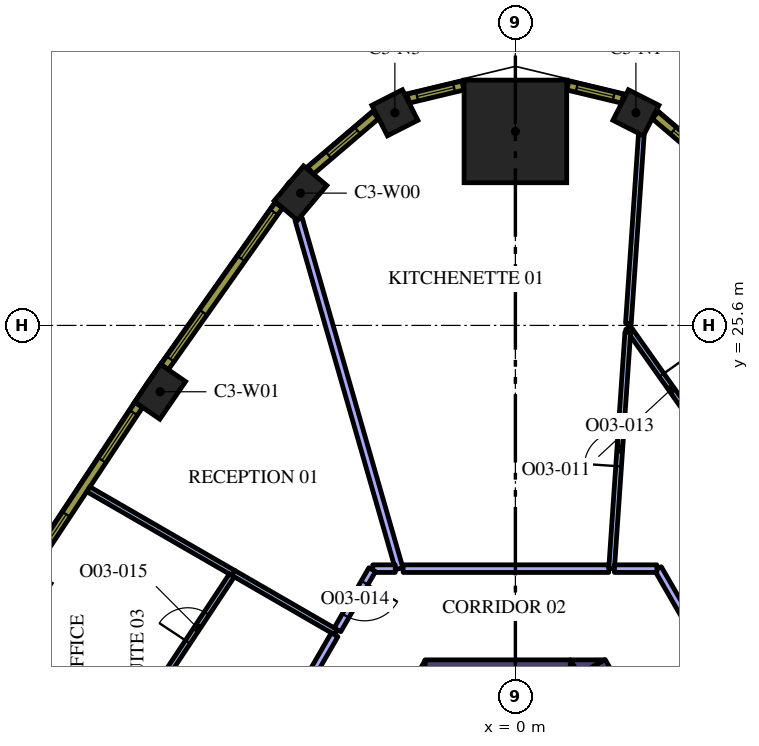
"""IFC4 building model, lengths in metres.
Left out: names, types, materials, properties, quantities, classifications, styles, units other than length and angle.
Written with IfcOpenShell. Run it as: python <this file> out.ifc"""

import sys

from ifc_helpers import new_model, si_unit, direction, frame, frame_2d, origin, origin_2d, place, context, subcontext, project, spatial, polyline, rectangle, outline, extrude, element, fill, save


model = new_model("IFC4")
c1 = context("Model", 3, precision=1e-05, world=origin(), true_north=direction((0.0, 1.0)))
c2 = subcontext(c1, "Body", "Model", "MODEL_VIEW")
j1 = project(units=[si_unit("LENGTHUNIT", "METRE"), si_unit("PLANEANGLEUNIT", "RADIAN")], contexts=[c1])
p1 = place(None, origin())
s1 = spatial("IfcSite", under=j1, at=p1, CompositionType="ELEMENT")
p2 = place(p1, origin())
s2 = spatial("IfcBuilding", under=s1, at=p2, CompositionType="ELEMENT")
p3 = place(p2, frame((0.0, 0.0, 166.8)))
s3 = spatial("IfcBuildingStorey", under=s2, at=p3, CompositionType="ELEMENT", Elevation=166.8)
p4 = place(p3, frame((0.0, 30.704, 0.0), z_axis=(0.0, 0.0, 1.0), x_axis=(0.0, 1.0, 0.0)))
e1 = element("IfcColumn", 1, at=p4, inside=s3, PredefinedType="COLUMN", context=c2, shape_type="SweptSolid", body=[
    extrude(rectangle(XDim=2.7, YDim=2.7, at=origin_2d()), origin(), (0.0, 0.0, 1.0), 4.2),
])
for number, where, z_axis, x_axis in (
    (2, (3.171, 31.195, 0.0), (0.0, 0.0, 1.0), (-0.891, 0.453, 0.0)),
    (3, (-3.171, 31.195, 0.0), (0.0, 0.0, 1.0), (-0.891, -0.453, 0.0)),
):
    element("IfcColumn", number, at=place(p3, frame(where, z_axis=z_axis, x_axis=x_axis)), inside=s3, PredefinedType="COLUMN", context=c2, shape_type="SweptSolid", body=[
        extrude(rectangle(XDim=0.9, YDim=0.9, at=origin_2d()), origin(), (0.0, 0.0, 1.0), 4.2),
    ])
for number, where, z_axis, x_axis in (
    (4, (-5.654, 29.081, 0.0), (0.0, 0.0, 1.0), (-0.644, -0.765, 0.0)),
    (5, (-9.348, 23.854, 0.0), (0.0, 0.0, 1.0), (-0.565, -0.825, 0.0)),
):
    element("IfcColumn", number, at=place(p3, frame(where, z_axis=z_axis, x_axis=x_axis)), inside=s3, PredefinedType="COLUMN", context=c2, shape_type="SweptSolid", body=[
        extrude(rectangle(XDim=1.2, YDim=0.8, at=origin_2d()), origin(), (0.0, 0.0, 1.0), 4.2),
    ])
p5 = place(p3, frame((8.279, 5.761, 0.0), z_axis=(0.0, 0.0, 1.0), x_axis=(-0.500010359015, 0.866019422922, 0.0)))
e6 = element("IfcWall", 6, at=p5, inside=s3, PredefinedType="SOLIDWALL", context=c2, shape_type="SweptSolid", body=[
    extrude(rectangle(XDim=12.528, YDim=0.8, at=frame_2d((6.264, 0.0))), origin(), (0.0, 0.0, 1.0), 4.2),
])
p6 = place(p3, origin())
e7 = element("IfcWall", 7, at=p6, inside=s3, PredefinedType="SOLIDWALL", context=c2, shape_type="SweptSolid", body=[
    extrude(outline(polyline([(1.443, 16.8), (2.339, 16.8), (1.667, 16.412), (1.443, 16.8)])), origin(), (0.0, 0.0, 1.0), 4.2),
])
p7 = place(p3, frame((-2.379, 16.4, 0.0), z_axis=(0.0, 0.0, 1.0), x_axis=(1.0, 0.0, 0.0)))
e8 = element("IfcWall", 8, at=p7, inside=s3, PredefinedType="SOLIDWALL", context=c2, shape_type="SweptSolid", body=[
    extrude(rectangle(XDim=3.824, YDim=0.8, at=frame_2d((1.912, 0.0))), origin(), (0.0, 0.0, 1.0), 4.2),
])
e9 = element("IfcWall", 9, at=p6, inside=s3, PredefinedType="SOLIDWALL", context=c2, shape_type="SweptSolid", body=[
    extrude(outline(polyline([(1.905, 16.0), (1.447, 16.0), (1.447, 16.793), (1.905, 16.0)])), origin(), (0.0, 0.0, 1.0), 4.2),
])
e10 = element("IfcWall", 10, at=p6, inside=s3, PredefinedType="SOLIDWALL", context=c2, shape_type="SweptSolid", body=[
    extrude(outline(polyline([(-2.829, 16.0), (-2.381, 16.776), (-2.381, 16.0), (-2.829, 16.0)])), origin(), (0.0, 0.0, 1.0), 4.2),
])
p8 = place(p3, frame((2.966, 25.539, 0.0), z_axis=(0.0, 0.0, 1.0), x_axis=(0.577099839594, -0.816673603798, 0.0)))
e11 = element("IfcWall", 11, at=p8, inside=s3, PredefinedType="PARTITIONING", context=c2, shape_type="SweptSolid", body=[
    extrude(rectangle(XDim=4.025, YDim=0.15, at=frame_2d((2.013, 0.0))), origin(), (0.0, 0.0, 1.0), 3.15),
])
p9 = place(p8, frame((1.525, 0.0, 0.0)))
e12 = element("IfcOpeningElement", 12, at=p9, cuts=e11, PredefinedType="OPENING", context=c2, shape_type="SweptSolid", body=[
    extrude(rectangle(XDim=0.9, YDim=2.1, at=frame_2d((0.45, 1.05))), frame((0.0, 0.085, 0.0), z_axis=(0.0, -1.0, 0.0), x_axis=(1.0, 0.0, 0.0)), (0.0, 0.0, 1.0), 0.17),
])
p10 = place(p3, frame((2.974, 25.657, 0.0), z_axis=(0.0, 0.0, 1.0), x_axis=(0.068301586051, 0.997664719905, 0.0)))
e13 = element("IfcWall", 13, at=p10, inside=s3, PredefinedType="PARTITIONING", context=c2, shape_type="SweptSolid", body=[
    extrude(rectangle(XDim=4.972, YDim=0.15, at=frame_2d((2.486, 0.0))), origin(), (0.0, 0.0, 1.0), 3.15),
])
p11 = place(p3, frame((2.531, 19.2, 0.0), z_axis=(0.0, 0.0, 1.0), x_axis=(0.06832771358, 0.997662930832, 0.0)))
e14 = element("IfcWall", 14, at=p11, inside=s3, PredefinedType="PARTITIONING", context=c2, shape_type="SweptSolid", body=[
    extrude(rectangle(XDim=6.235, YDim=0.15, at=frame_2d((3.118, 0.0))), origin(), (0.0, 0.0, 1.0), 3.15),
])
p12 = place(p11, frame((2.7, 0.0, 0.0)))
e15 = element("IfcOpeningElement", 15, at=p12, cuts=e14, PredefinedType="OPENING", context=c2, shape_type="SweptSolid", body=[
    extrude(rectangle(XDim=0.9, YDim=2.1, at=frame_2d((0.45, 1.05))), frame((0.0, 0.085, 0.0), z_axis=(0.0, -1.0, 0.0), x_axis=(1.0, 0.0, 0.0)), (0.0, 0.0, 1.0), 0.17),
])
p13 = place(p3, frame((7.872, 12.064, 0.0), z_axis=(0.0, 0.0, 1.0), x_axis=(-0.499995192696, 0.866028179265, 0.0)))
e16 = element("IfcWall", 16, at=p13, inside=s3, PredefinedType="PARTITIONING", context=c2, shape_type="SweptSolid", body=[
    extrude(rectangle(XDim=8.239, YDim=0.2, at=frame_2d((4.12, 0.0))), origin(), (0.0, 0.0, 1.0), 3.15),
])
p14 = place(p13, frame((3.6, 0.0, 0.0)))
e17 = element("IfcOpeningElement", 17, at=p14, cuts=e16, PredefinedType="OPENING", context=c2, shape_type="SweptSolid", body=[
    extrude(rectangle(XDim=1.0, YDim=2.1, at=frame_2d((0.5, 1.05))), frame((0.0, 0.11, 0.0), z_axis=(0.0, -1.0, 0.0), x_axis=(1.0, 0.0, 0.0)), (0.0, 0.0, 1.0), 0.22),
])
p15 = place(p3, frame((3.723, 19.2, 0.0), z_axis=(0.0, 0.0, 1.0), x_axis=(-1.0, 0.0, 0.0)))
e18 = element("IfcWall", 18, at=p15, inside=s3, PredefinedType="PARTITIONING", context=c2, shape_type="SweptSolid", body=[
    extrude(rectangle(XDim=1.116, YDim=0.2, at=frame_2d((0.558, 0.0))), origin(), (0.0, 0.0, 1.0), 3.15),
])
p16 = place(p3, frame((-3.058, 19.2, 0.0), z_axis=(0.0, 0.0, 1.0), x_axis=(-0.276542988003, 0.961001548275, 0.0)))
e19 = element("IfcWall", 19, at=p16, inside=s3, PredefinedType="PARTITIONING", context=c2, shape_type="SweptSolid", body=[
    extrude(rectangle(XDim=9.573, YDim=0.2, at=frame_2d((4.786, 0.0))), origin(), (0.0, 0.0, 1.0), 3.15),
])
p17 = place(p3, frame((2.456, 19.2, 0.0), z_axis=(0.0, 0.0, 1.0), x_axis=(-1.0, 0.0, 0.0)))
e20 = element("IfcWall", 20, at=p17, inside=s3, PredefinedType="PARTITIONING", context=c2, shape_type="SweptSolid", body=[
    extrude(rectangle(XDim=5.41, YDim=0.2, at=frame_2d((2.705, 0.0))), origin(), (0.0, 0.0, 1.0), 3.15),
])
p18 = place(p3, frame((-7.416, 19.083, 0.0), z_axis=(0.0, 0.0, 1.0), x_axis=(-0.866028016946, 0.499995473844, 0.0)))
e21 = element("IfcWall", 21, at=p18, inside=s3, PredefinedType="PARTITIONING", context=c2, shape_type="SweptSolid", body=[
    extrude(rectangle(XDim=4.412, YDim=0.15, at=frame_2d((2.206, 0.0))), origin(), (0.0, 0.0, 1.0), 3.15),
])
p19 = place(p3, frame((-4.719, 17.526, 0.0), z_axis=(0.0, 0.0, 1.0), x_axis=(-0.866011075544, 0.500024816419, 0.0)))
e22 = element("IfcWall", 22, at=p19, inside=s3, PredefinedType="PARTITIONING", context=c2, shape_type="SweptSolid", body=[
    extrude(rectangle(XDim=3.122, YDim=0.15, at=frame_2d((1.561, 0.0))), origin(), (0.0, 0.0, 1.0), 3.15),
])
p20 = place(p3, frame((-3.162, 19.2, 0.0), z_axis=(0.0, 0.0, 1.0), x_axis=(-1.0, 0.0, 0.0)))
e23 = element("IfcWall", 23, at=p20, inside=s3, PredefinedType="PARTITIONING", context=c2, shape_type="SweptSolid", body=[
    extrude(rectangle(XDim=0.591, YDim=0.2, at=frame_2d((0.295, 0.0))), origin(), (0.0, 0.0, 1.0), 3.15),
])
p21 = place(p3, frame((-3.768, 19.174, 0.0), z_axis=(0.0, 0.0, 1.0), x_axis=(-0.499930512259, -0.866065518833, 0.0)))
e24 = element("IfcWall", 24, at=p21, inside=s3, PredefinedType="PARTITIONING", context=c2, shape_type="SweptSolid", body=[
    extrude(rectangle(XDim=1.828, YDim=0.2, at=frame_2d((0.914, 0.0))), origin(), (0.0, 0.0, 1.0), 3.15),
])
p22 = place(p21, frame((0.4, 0.0, 0.0)))
e25 = element("IfcOpeningElement", 25, at=p22, cuts=e24, PredefinedType="OPENING", context=c2, shape_type="SweptSolid", body=[
    extrude(rectangle(XDim=1.0, YDim=2.1, at=frame_2d((0.5, 1.05))), frame((0.0, 0.11, 0.0), z_axis=(0.0, -1.0, 0.0), x_axis=(1.0, 0.0, 0.0)), (0.0, 0.0, 1.0), 0.22),
])
p23 = place(p3, frame((-9.308, 16.231, 0.0), z_axis=(0.0, 0.0, 1.0), x_axis=(0.551902709159, 0.833908507945, 0.0)))
e26 = element("IfcWall", 26, at=p23, inside=s3, PredefinedType="PARTITIONING", context=c2, shape_type="SweptSolid", body=[
    extrude(rectangle(XDim=3.347, YDim=0.15, at=frame_2d((1.673, 0.0))), origin(), (0.0, 0.0, 1.0), 3.15),
])
p24 = place(p23, frame((1.247, 0.0, 0.0)))
e27 = element("IfcOpeningElement", 27, at=p24, cuts=e26, PredefinedType="OPENING", context=c2, shape_type="SweptSolid", body=[
    extrude(rectangle(XDim=0.9, YDim=2.1, at=frame_2d((0.45, 1.05))), frame((0.0, 0.085, 0.0), z_axis=(0.0, -1.0, 0.0), x_axis=(1.0, 0.0, 0.0)), (0.0, 0.0, 1.0), 0.17),
])
p25 = place(p3, frame((-4.757, 17.461, 0.0), z_axis=(0.0, 0.0, 1.0), x_axis=(-0.499998278779, -0.866026397529, 0.0)))
e28 = element("IfcWall", 28, at=p25, inside=s3, PredefinedType="PARTITIONING", context=c2, shape_type="SweptSolid", body=[
    extrude(rectangle(XDim=8.709, YDim=0.2, at=frame_2d((4.354, 0.0))), origin(), (0.0, 0.0, 1.0), 3.15),
])
p26 = place(p3, frame((5.392, 29.672, 0.0), z_axis=(0.0, 0.0, 1.0), x_axis=(-0.761419744247, 0.648259186645, 0.0)))
e29 = element("IfcWall", 29, at=p26, inside=s3, PredefinedType="SOLIDWALL", context=c2, shape_type="SweptSolid", body=[
    extrude(rectangle(XDim=2.25, YDim=0.24, at=frame_2d((1.125, 0.0))), origin(), (0.0, 0.0, 1.0), 3.95),
])
p27 = place(p26, frame((0.625, 0.0, 0.9)))
e30 = element("IfcOpeningElement", 30, at=p27, cuts=e29, PredefinedType="OPENING", context=c2, shape_type="SweptSolid", body=[
    extrude(rectangle(XDim=1.0, YDim=2.55, at=frame_2d((0.5, 1.275))), frame((0.0, 0.13, 0.0), z_axis=(0.0, -1.0, 0.0), x_axis=(1.0, 0.0, 0.0)), (0.0, 0.0, 1.0), 0.26),
])
p28 = place(p3, frame((2.821, 31.566, 0.0), z_axis=(0.0, 0.0, 1.0), x_axis=(-0.972479955788, 0.232986556673, 0.0)))
e31 = element("IfcWall", 31, at=p28, inside=s3, PredefinedType="SOLIDWALL", context=c2, shape_type="SweptSolid", body=[
    extrude(rectangle(XDim=1.482, YDim=0.24, at=frame_2d((0.741, 0.0))), origin(), (0.0, 0.0, 1.0), 3.95),
])
p29 = place(p28, frame((0.241, 0.0, 0.9)))
e32 = element("IfcOpeningElement", 32, at=p29, cuts=e31, PredefinedType="OPENING", context=c2, shape_type="SweptSolid", body=[
    extrude(rectangle(XDim=1.0, YDim=2.55, at=frame_2d((0.5, 1.275))), frame((0.0, 0.13, 0.0), z_axis=(0.0, -1.0, 0.0), x_axis=(1.0, 0.0, 0.0)), (0.0, 0.0, 1.0), 0.26),
])
p30 = place(p3, frame((-1.38, 31.912, 0.0), z_axis=(0.0, 0.0, 1.0), x_axis=(-0.972479955788, -0.232986556673, 0.0)))
e33 = element("IfcWall", 33, at=p30, inside=s3, PredefinedType="SOLIDWALL", context=c2, shape_type="SweptSolid", body=[
    extrude(rectangle(XDim=1.482, YDim=0.24, at=frame_2d((0.741, 0.0))), origin(), (0.0, 0.0, 1.0), 3.95),
])
p31 = place(p30, frame((0.241, 0.0, 0.9)))
e34 = element("IfcOpeningElement", 34, at=p31, cuts=e33, PredefinedType="OPENING", context=c2, shape_type="SweptSolid", body=[
    extrude(rectangle(XDim=1.0, YDim=2.55, at=frame_2d((0.5, 1.275))), frame((0.0, 0.13, 0.0), z_axis=(0.0, -1.0, 0.0), x_axis=(1.0, 0.0, 0.0)), (0.0, 0.0, 1.0), 0.26),
])
p32 = place(p3, frame((-3.678, 31.131, 0.0), z_axis=(0.0, 0.0, 1.0), x_axis=(-0.761419744247, -0.648259186645, 0.0)))
e35 = element("IfcWall", 35, at=p32, inside=s3, PredefinedType="SOLIDWALL", context=c2, shape_type="SweptSolid", body=[
    extrude(rectangle(XDim=2.25, YDim=0.24, at=frame_2d((1.125, 0.0))), origin(), (0.0, 0.0, 1.0), 3.95),
])
p33 = place(p32, frame((0.625, 0.0, 0.9)))
e36 = element("IfcOpeningElement", 36, at=p33, cuts=e35, PredefinedType="OPENING", context=c2, shape_type="SweptSolid", body=[
    extrude(rectangle(XDim=1.0, YDim=2.55, at=frame_2d((0.5, 1.275))), frame((0.0, 0.13, 0.0), z_axis=(0.0, -1.0, 0.0), x_axis=(1.0, 0.0, 0.0)), (0.0, 0.0, 1.0), 0.26),
])
p34 = place(p3, frame((-6.223, 28.762, 0.0), z_axis=(0.0, 0.0, 1.0), x_axis=(-0.577115207679, -0.816662743772, 0.0)))
e37 = element("IfcWall", 37, at=p34, inside=s3, PredefinedType="SOLIDWALL", context=c2, shape_type="SweptSolid", body=[
    extrude(rectangle(XDim=5.213, YDim=0.24, at=frame_2d((2.606, 0.0))), origin(), (0.0, 0.0, 1.0), 3.95),
])
p35 = place(p34, frame((0.221, 0.0, 0.9)))
e38 = element("IfcOpeningElement", 38, at=p35, cuts=e37, PredefinedType="OPENING", context=c2, shape_type="SweptSolid", body=[
    extrude(rectangle(XDim=1.5, YDim=2.55, at=frame_2d((0.75, 1.275))), frame((0.0, 0.13, 0.0), z_axis=(0.0, -1.0, 0.0), x_axis=(1.0, 0.0, 0.0)), (0.0, 0.0, 1.0), 0.26),
])
p36 = place(p34, frame((3.452, 0.0, 0.9)))
e39 = element("IfcOpeningElement", 39, at=p36, cuts=e37, PredefinedType="OPENING", context=c2, shape_type="SweptSolid", body=[
    extrude(rectangle(XDim=1.5, YDim=2.55, at=frame_2d((0.75, 1.275))), frame((0.0, 0.13, 0.0), z_axis=(0.0, -1.0, 0.0), x_axis=(1.0, 0.0, 0.0)), (0.0, 0.0, 1.0), 0.26),
])
p37 = place(p3, frame((-9.911, 23.51, 0.0), z_axis=(0.0, 0.0, 1.0), x_axis=(-0.551892811511, -0.833915058386, 0.0)))
e40 = element("IfcWall", 40, at=p37, inside=s3, PredefinedType="SOLIDWALL", context=c2, shape_type="SweptSolid", body=[
    extrude(rectangle(XDim=5.204, YDim=0.24, at=frame_2d((2.602, 0.0))), origin(), (0.0, 0.0, 1.0), 3.95),
])
p38 = place(p37, frame((0.248, 0.0, 0.9)))
e41 = element("IfcOpeningElement", 41, at=p38, cuts=e40, PredefinedType="OPENING", context=c2, shape_type="SweptSolid", body=[
    extrude(rectangle(XDim=1.5, YDim=2.55, at=frame_2d((0.75, 1.275))), frame((0.0, 0.13, 0.0), z_axis=(0.0, -1.0, 0.0), x_axis=(1.0, 0.0, 0.0)), (0.0, 0.0, 1.0), 0.26),
])
p39 = place(p37, frame((3.455, 0.0, 0.9)))
e42 = element("IfcOpeningElement", 42, at=p39, cuts=e40, PredefinedType="OPENING", context=c2, shape_type="SweptSolid", body=[
    extrude(rectangle(XDim=1.5, YDim=2.55, at=frame_2d((0.75, 1.275))), frame((0.0, 0.13, 0.0), z_axis=(0.0, -1.0, 0.0), x_axis=(1.0, 0.0, 0.0)), (0.0, 0.0, 1.0), 0.26),
])
p40 = place(p9, origin())
e43 = element("IfcDoor", 43, at=p40, inside=s3, OperationType="SINGLE_SWING_LEFT", PredefinedType="DOOR", context=c2, shape_type="SweptSolid", body=[
    extrude(rectangle(XDim=0.9, YDim=2.1, at=frame_2d((0.45, 1.05))), frame((0.0, 0.025, 0.0), z_axis=(0.0, -1.0, 0.0), x_axis=(1.0, 0.0, 0.0)), (0.0, 0.0, 1.0), 0.05),
])
fill(e12, e43)
p41 = place(p12, origin())
e44 = element("IfcDoor", 44, at=p41, inside=s3, OperationType="SINGLE_SWING_RIGHT", PredefinedType="DOOR", context=c2, shape_type="SweptSolid", body=[
    extrude(rectangle(XDim=0.9, YDim=2.1, at=frame_2d((0.45, 1.05))), frame((0.0, 0.025, 0.0), z_axis=(0.0, -1.0, 0.0), x_axis=(1.0, 0.0, 0.0)), (0.0, 0.0, 1.0), 0.05),
])
fill(e15, e44)
p42 = place(p22, origin())
e45 = element("IfcDoor", 45, at=p42, inside=s3, OperationType="SINGLE_SWING_LEFT", PredefinedType="DOOR", context=c2, shape_type="SweptSolid", body=[
    extrude(rectangle(XDim=1.0, YDim=2.1, at=frame_2d((0.5, 1.05))), frame((0.0, 0.025, 0.0), z_axis=(0.0, -1.0, 0.0), x_axis=(1.0, 0.0, 0.0)), (0.0, 0.0, 1.0), 0.05),
])
fill(e25, e45)
p43 = place(p24, origin())
e46 = element("IfcDoor", 46, at=p43, inside=s3, OperationType="SINGLE_SWING_RIGHT", PredefinedType="DOOR", context=c2, shape_type="SweptSolid", body=[
    extrude(rectangle(XDim=0.9, YDim=2.1, at=frame_2d((0.45, 1.05))), frame((0.0, 0.025, 0.0), z_axis=(0.0, -1.0, 0.0), x_axis=(1.0, 0.0, 0.0)), (0.0, 0.0, 1.0), 0.05),
])
fill(e27, e46)
p44 = place(p27, origin())
e47 = element("IfcWindow", 47, at=p44, inside=s3, PartitioningType="SINGLE_PANEL", PredefinedType="WINDOW", context=c2, shape_type="SweptSolid", body=[
    extrude(rectangle(XDim=1.0, YDim=2.55, at=frame_2d((0.5, 1.275))), frame((0.0, 0.04, 0.0), z_axis=(0.0, -1.0, 0.0), x_axis=(1.0, 0.0, 0.0)), (0.0, 0.0, 1.0), 0.06),
])
fill(e30, e47)
p45 = place(p29, origin())
e48 = element("IfcWindow", 48, at=p45, inside=s3, PartitioningType="SINGLE_PANEL", PredefinedType="WINDOW", context=c2, shape_type="SweptSolid", body=[
    extrude(rectangle(XDim=1.0, YDim=2.55, at=frame_2d((0.5, 1.275))), frame((0.0, 0.04, 0.0), z_axis=(0.0, -1.0, 0.0), x_axis=(1.0, 0.0, 0.0)), (0.0, 0.0, 1.0), 0.06),
])
fill(e32, e48)
p46 = place(p31, origin())
e49 = element("IfcWindow", 49, at=p46, inside=s3, PartitioningType="SINGLE_PANEL", PredefinedType="WINDOW", context=c2, shape_type="SweptSolid", body=[
    extrude(rectangle(XDim=1.0, YDim=2.55, at=frame_2d((0.5, 1.275))), frame((0.0, 0.04, 0.0), z_axis=(0.0, -1.0, 0.0), x_axis=(1.0, 0.0, 0.0)), (0.0, 0.0, 1.0), 0.06),
])
fill(e34, e49)
p47 = place(p33, origin())
e50 = element("IfcWindow", 50, at=p47, inside=s3, PartitioningType="SINGLE_PANEL", PredefinedType="WINDOW", context=c2, shape_type="SweptSolid", body=[
    extrude(rectangle(XDim=1.0, YDim=2.55, at=frame_2d((0.5, 1.275))), frame((0.0, 0.04, 0.0), z_axis=(0.0, -1.0, 0.0), x_axis=(1.0, 0.0, 0.0)), (0.0, 0.0, 1.0), 0.06),
])
fill(e36, e50)
p48 = place(p35, origin())
e51 = element("IfcWindow", 51, at=p48, inside=s3, PartitioningType="SINGLE_PANEL", PredefinedType="WINDOW", context=c2, shape_type="SweptSolid", body=[
    extrude(rectangle(XDim=1.5, YDim=2.55, at=frame_2d((0.75, 1.275))), frame((0.0, 0.04, 0.0), z_axis=(0.0, -1.0, 0.0), x_axis=(1.0, 0.0, 0.0)), (0.0, 0.0, 1.0), 0.06),
])
fill(e38, e51)
p49 = place(p36, origin())
e52 = element("IfcWindow", 52, at=p49, inside=s3, PartitioningType="SINGLE_PANEL", PredefinedType="WINDOW", context=c2, shape_type="SweptSolid", body=[
    extrude(rectangle(XDim=1.5, YDim=2.55, at=frame_2d((0.75, 1.275))), frame((0.0, 0.04, 0.0), z_axis=(0.0, -1.0, 0.0), x_axis=(1.0, 0.0, 0.0)), (0.0, 0.0, 1.0), 0.06),
])
fill(e39, e52)
p50 = place(p38, origin())
e53 = element("IfcWindow", 53, at=p50, inside=s3, PartitioningType="SINGLE_PANEL", PredefinedType="WINDOW", context=c2, shape_type="SweptSolid", body=[
    extrude(rectangle(XDim=1.5, YDim=2.55, at=frame_2d((0.75, 1.275))), frame((0.0, 0.04, 0.0), z_axis=(0.0, -1.0, 0.0), x_axis=(1.0, 0.0, 0.0)), (0.0, 0.0, 1.0), 0.06),
])
fill(e41, e53)
p51 = place(p39, origin())
e54 = element("IfcWindow", 54, at=p51, inside=s3, PartitioningType="SINGLE_PANEL", PredefinedType="WINDOW", context=c2, shape_type="SweptSolid", body=[
    extrude(rectangle(XDim=1.5, YDim=2.55, at=frame_2d((0.75, 1.275))), frame((0.0, 0.04, 0.0), z_axis=(0.0, -1.0, 0.0), x_axis=(1.0, 0.0, 0.0)), (0.0, 0.0, 1.0), 0.06),
])
fill(e42, e54)
save(model, sys.argv[1])
